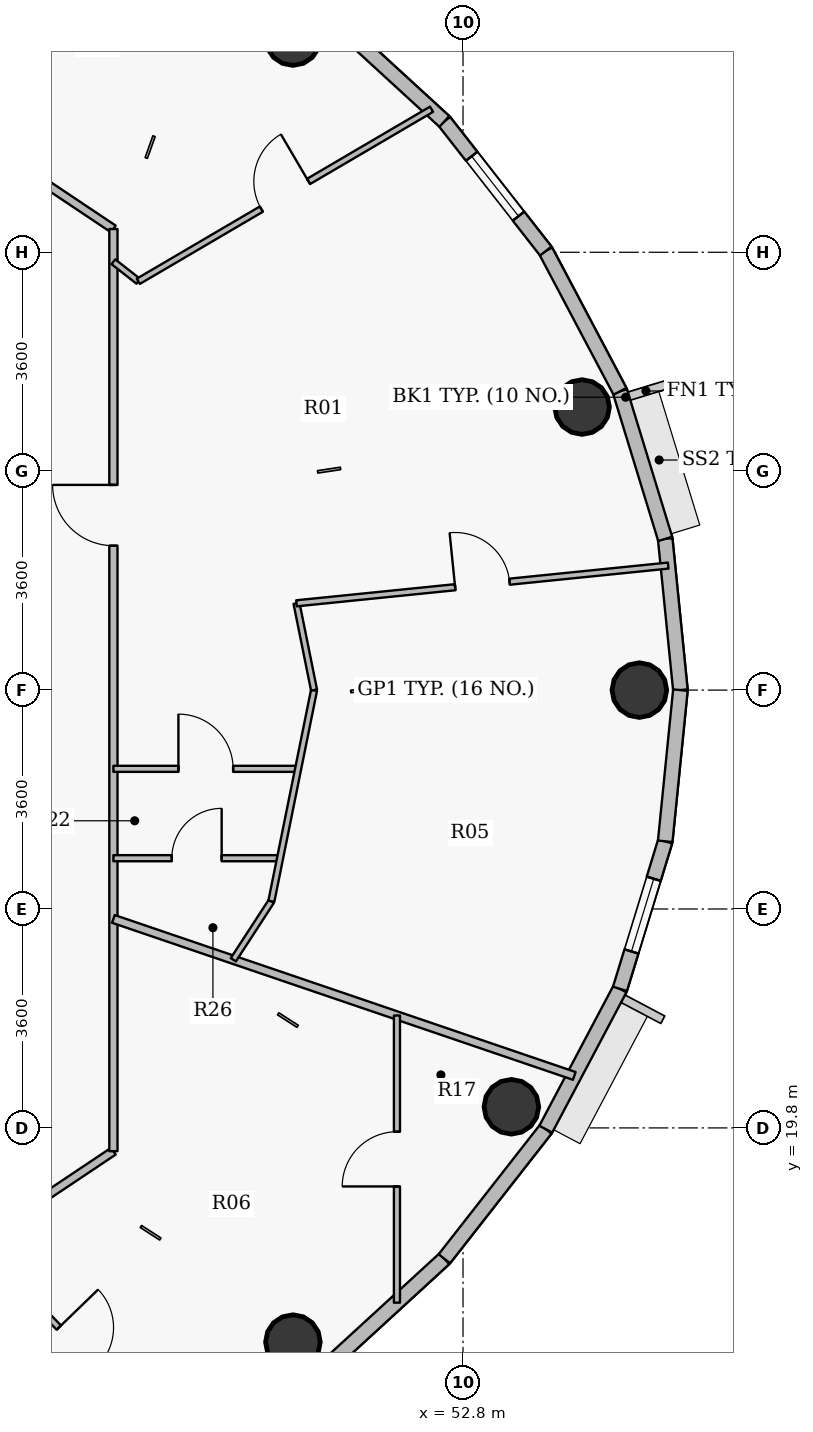
"""IFC4 building model, lengths in metres.
Left out: names, types, materials, properties, quantities, classifications, styles, units other than length and angle.
Written with IfcOpenShell. Run it as: python <this file> out.ifc"""

import sys

from ifc_helpers import new_model, si_unit, direction, frame, frame_2d, origin, origin_2d, place, context, subcontext, project, spatial, rectangle, hollow_circle, extrude, source, transform, mapped, element, fill, save


model = new_model("IFC4")
c1 = context("Model", 3, precision=1e-05, world=origin(), true_north=direction((0.0, 1.0)))
c2 = subcontext(c1, "Body", "Model", "MODEL_VIEW")
j1 = project(units=[si_unit("LENGTHUNIT", "METRE"), si_unit("PLANEANGLEUNIT", "RADIAN")], contexts=[c1])
p1 = place(None, origin())
s1 = spatial("IfcSite", under=j1, at=p1, CompositionType="ELEMENT")
p2 = place(p1, origin())
s2 = spatial("IfcBuilding", under=s1, at=p2, CompositionType="ELEMENT")
p3 = place(p2, frame((0.0, 0.0, 331.6)))
s3 = spatial("IfcBuildingStorey", under=s2, at=p3, CompositionType="ELEMENT", Elevation=331.6)
for number, where, z_axis, x_axis in (
    (1, (55.7, 27.0, 0.0), (0.0, 0.0, 1.0), (1.0, 0.0, 0.0)),
    (2, (54.758, 31.655, 0.0), (0.0, 0.0, 1.0), (1.0, 0.0, 0.0)),
    (3, (50.002, 37.723, 0.0), (0.0, 0.0, 1.0), (1.0, 0.0, 0.0)),
    (4, (50.002, 16.277, 0.0), (0.0, 0.0, 1.0), (1.0, 0.0, 0.0)),
    (5, (53.595, 20.147, 0.0), (0.0, 0.0, 1.0), (1.0, 0.0, 0.0)),
):
    element("IfcColumn", number, at=place(p3, frame(where, z_axis=z_axis, x_axis=x_axis)), inside=s3, PredefinedType="COLUMN", context=c2, shape_type="SweptSolid", body=[
        extrude(hollow_circle(Radius=0.45, WallThickness=0.028, at=origin_2d()), origin(), (0.0, 0.0, 1.0), 3.8),
    ])
p4 = place(p3, frame((56.125, 29.487, 0.0), z_axis=(0.0, 0.0, 1.0), x_axis=(0.100025963401, -0.994984827344, 0.0)))
e6 = element("IfcWall", 6, at=p4, inside=s3, PredefinedType="SOLIDWALL", context=c2, shape_type="SweptSolid", body=[
    extrude(rectangle(XDim=2.499, YDim=0.24, at=frame_2d((1.25, 0.0))), origin(), (0.0, 0.0, 1.0), 3.55),
])
p5 = place(p3, frame((55.381, 31.913, 0.0), z_axis=(0.0, 0.0, 1.0), x_axis=(0.293105547213, -0.956080089842, 0.0)))
e7 = element("IfcWall", 7, at=p5, inside=s3, PredefinedType="SOLIDWALL", context=c2, shape_type="SweptSolid", body=[
    extrude(rectangle(XDim=2.538, YDim=0.24, at=frame_2d((1.269, 0.0))), origin(), (0.0, 0.0, 1.0), 3.55),
])
p6 = place(p3, frame((54.161, 34.221, 0.0), z_axis=(0.0, 0.0, 1.0), x_axis=(0.467487999989, -0.883999417345, 0.0)))
e8 = element("IfcWall", 8, at=p6, inside=s3, PredefinedType="SOLIDWALL", context=c2, shape_type="SweptSolid", body=[
    extrude(rectangle(XDim=2.61, YDim=0.24, at=frame_2d((1.305, 0.0))), origin(), (0.0, 0.0, 1.0), 3.55),
])
p7 = place(p3, frame((52.493, 36.352, 0.0), z_axis=(0.0, 0.0, 1.0), x_axis=(0.616286367698, -0.78752213492, 0.0)))
e9 = element("IfcWall", 9, at=p7, inside=s3, PredefinedType="SOLIDWALL", context=c2, shape_type="SweptSolid", body=[
    extrude(rectangle(XDim=2.706, YDim=0.24, at=frame_2d((1.353, 0.0))), origin(), (0.0, 0.0, 1.0), 3.55),
])
p8 = place(p7, frame((0.728, 0.0, 0.9)))
e10 = element("IfcOpeningElement", 10, at=p8, cuts=e9, PredefinedType="OPENING", context=c2, shape_type="SweptSolid", body=[
    extrude(rectangle(XDim=1.25, YDim=1.65, at=origin_2d()), frame((0.625, 0.13, 0.825), z_axis=(0.0, -1.0, 0.0), x_axis=(1.0, 0.0, 0.0)), (0.0, 0.0, 1.0), 0.26),
])
for number, where, z_axis, x_axis in (
    (11, (50.419, 38.254, 0.0), (0.0, 0.0, 1.0), (0.737, -0.676, 0.0)),
    (12, (52.493, 17.648, 0.0), (0.0, 0.0, 1.0), (-0.737, -0.676, 0.0)),
):
    element("IfcWall", number, at=place(p3, frame(where, z_axis=z_axis, x_axis=x_axis)), inside=s3, PredefinedType="SOLIDWALL", context=c2, shape_type="SweptSolid", body=[
        extrude(rectangle(XDim=2.815, YDim=0.24, at=frame_2d((1.407, 0.0))), origin(), (0.0, 0.0, 1.0), 3.55),
    ])
p9 = place(p3, frame((54.161, 19.779, 0.0), z_axis=(0.0, 0.0, 1.0), x_axis=(-0.616286367698, -0.78752213492, 0.0)))
e13 = element("IfcWall", 13, at=p9, inside=s3, PredefinedType="SOLIDWALL", context=c2, shape_type="SweptSolid", body=[
    extrude(rectangle(XDim=2.706, YDim=0.24, at=frame_2d((1.353, 0.0))), origin(), (0.0, 0.0, 1.0), 3.55),
])
p10 = place(p3, frame((55.381, 22.087, 0.0), z_axis=(0.0, 0.0, 1.0), x_axis=(-0.467487999989, -0.883999417345, 0.0)))
e14 = element("IfcWall", 14, at=p10, inside=s3, PredefinedType="SOLIDWALL", context=c2, shape_type="SweptSolid", body=[
    extrude(rectangle(XDim=2.61, YDim=0.24, at=frame_2d((1.305, 0.0))), origin(), (0.0, 0.0, 1.0), 3.55),
])
p11 = place(p3, frame((56.125, 24.513, 0.0), z_axis=(0.0, 0.0, 1.0), x_axis=(-0.293105547213, -0.956080089842, 0.0)))
e15 = element("IfcWall", 15, at=p11, inside=s3, PredefinedType="SOLIDWALL", context=c2, shape_type="SweptSolid", body=[
    extrude(rectangle(XDim=2.538, YDim=0.24, at=frame_2d((1.269, 0.0))), origin(), (0.0, 0.0, 1.0), 3.55),
])
p12 = place(p11, frame((0.644, 0.0, 0.9)))
e16 = element("IfcOpeningElement", 16, at=p12, cuts=e15, PredefinedType="OPENING", context=c2, shape_type="SweptSolid", body=[
    extrude(rectangle(XDim=1.25, YDim=1.65, at=origin_2d()), frame((0.625, 0.13, 0.825), z_axis=(0.0, -1.0, 0.0), x_axis=(1.0, 0.0, 0.0)), (0.0, 0.0, 1.0), 0.26),
])
p13 = place(p3, frame((56.375, 27.0, 0.0), z_axis=(0.0, 0.0, 1.0), x_axis=(-0.100025963401, -0.994984827344, 0.0)))
e17 = element("IfcWall", 17, at=p13, inside=s3, PredefinedType="SOLIDWALL", context=c2, shape_type="SweptSolid", body=[
    extrude(rectangle(XDim=2.499, YDim=0.24, at=frame_2d((1.25, 0.0))), origin(), (0.0, 0.0, 1.0), 3.55),
])
p14 = place(p3, frame((44.645, 18.073, 0.0), z_axis=(0.0, 0.0, 1.0), x_axis=(0.695656073062, -0.718374991221, 0.0)))
e18 = element("IfcWall", 18, at=p14, inside=s3, PredefinedType="PARTITIONING", context=c2, shape_type="SweptSolid", body=[
    extrude(rectangle(XDim=5.233, YDim=0.1, at=frame_2d((2.617, 0.0))), origin(), (0.0, 0.0, 1.0), 3.035),
])
p15 = place(p14, frame((2.167, 0.0, 0.0)))
e19 = element("IfcOpeningElement", 19, at=p15, cuts=e18, PredefinedType="OPENING", context=c2, shape_type="SweptSolid", body=[
    extrude(rectangle(XDim=0.9, YDim=2.1, at=origin_2d()), frame((0.45, 0.06, 1.05), z_axis=(0.0, -1.0, 0.0), x_axis=(1.0, 0.0, 0.0)), (0.0, 0.0, 1.0), 0.12),
])
for number, where, z_axis, x_axis in (
    (20, (45.541, 18.408, 0.0), (0.0, 0.0, 1.0), (0.831, 0.556, 0.0)),
    (21, (45.541, 35.592, 0.0), (0.0, 0.0, 1.0), (0.831, -0.556, 0.0)),
):
    element("IfcWall", number, at=place(p3, frame(where, z_axis=z_axis, x_axis=x_axis)), inside=s3, PredefinedType="PARTITIONING", context=c2, shape_type="SweptSolid", body=[
        extrude(rectangle(XDim=1.815, YDim=0.135, at=frame_2d((0.908, 0.0))), origin(), (0.0, 0.0, 1.0), 3.085),
    ])
p16 = place(p3, frame((47.05, 19.417, 0.0), z_axis=(0.0, 0.0, 1.0), x_axis=(0.0, 1.0, 0.0)))
e22 = element("IfcWall", 22, at=p16, inside=s3, PredefinedType="PARTITIONING", context=c2, shape_type="SweptSolid", body=[
    extrude(rectangle(XDim=15.165, YDim=0.135, at=frame_2d((7.583, 0.0))), origin(), (0.0, 0.0, 1.0), 3.085),
])
p17 = place(p16, frame((9.957, 0.0, 0.0)))
e23 = element("IfcOpeningElement", 23, at=p17, cuts=e22, PredefinedType="OPENING", context=c2, shape_type="SweptSolid", body=[
    extrude(rectangle(XDim=1.0, YDim=2.15, at=origin_2d()), frame((0.5, 0.078, 1.075), z_axis=(0.0, -1.0, 0.0), x_axis=(1.0, 0.0, 0.0)), (0.0, 0.0, 1.0), 0.155),
])
p18 = place(p3, frame((47.05, 23.237, 0.0), z_axis=(0.0, 0.0, 1.0), x_axis=(0.946614475353, -0.32236785673, 0.0)))
e24 = element("IfcWall", 24, at=p18, inside=s3, PredefinedType="PARTITIONING", context=c2, shape_type="SweptSolid", body=[
    extrude(rectangle(XDim=8.007, YDim=0.135, at=frame_2d((4.004, 0.0))), origin(), (0.0, 0.0, 1.0), 3.035),
])
p19 = place(p3, frame((47.05, 24.235, 0.0), z_axis=(0.0, 0.0, 1.0), x_axis=(1.0, 0.0, 0.0)))
e25 = element("IfcWall", 25, at=p19, inside=s3, PredefinedType="PARTITIONING", context=c2, shape_type="SweptSolid", body=[
    extrude(rectangle(XDim=2.741, YDim=0.1, at=frame_2d((1.37, 0.0))), origin(), (0.0, 0.0, 1.0), 3.55),
])
p20 = place(p19, frame((0.96, 0.0, 0.0)))
e26 = element("IfcOpeningElement", 26, at=p20, cuts=e25, PredefinedType="OPENING", context=c2, shape_type="SweptSolid", body=[
    extrude(rectangle(XDim=0.82, YDim=2.1, at=origin_2d()), frame((0.41, 0.06, 1.05), z_axis=(0.0, -1.0, 0.0), x_axis=(1.0, 0.0, 0.0)), (0.0, 0.0, 1.0), 0.12),
])
p21 = place(p3, frame((47.05, 25.705, 0.0), z_axis=(0.0, 0.0, 1.0), x_axis=(1.0, 0.0, 0.0)))
e27 = element("IfcWall", 27, at=p21, inside=s3, PredefinedType="PARTITIONING", context=c2, shape_type="SweptSolid", body=[
    extrude(rectangle(XDim=3.038, YDim=0.1, at=frame_2d((1.519, 0.0))), origin(), (0.0, 0.0, 1.0), 3.55),
])
p22 = place(p21, frame((1.069, 0.0, 0.0)))
e28 = element("IfcOpeningElement", 28, at=p22, cuts=e27, PredefinedType="OPENING", context=c2, shape_type="SweptSolid", body=[
    extrude(rectangle(XDim=0.9, YDim=2.1, at=origin_2d()), frame((0.45, 0.06, 1.05), z_axis=(0.0, -1.0, 0.0), x_axis=(1.0, 0.0, 0.0)), (0.0, 0.0, 1.0), 0.12),
])
p23 = place(p3, frame((47.05, 34.044, 0.0), z_axis=(0.0, 0.0, 1.0), x_axis=(0.787277370311, -0.616599012483, 0.0)))
e29 = element("IfcWall", 29, at=p23, inside=s3, PredefinedType="PARTITIONING", context=c2, shape_type="SweptSolid", body=[
    extrude(rectangle(XDim=0.521, YDim=0.1, at=frame_2d((0.26, 0.0))), origin(), (0.0, 0.0, 1.0), 3.55),
])
p24 = place(p3, frame((47.46, 33.723, 0.0), z_axis=(0.0, 0.0, 1.0), x_axis=(0.862533037069, 0.506000750952, 0.0)))
e30 = element("IfcWall", 30, at=p24, inside=s3, PredefinedType="PARTITIONING", context=c2, shape_type="SweptSolid", body=[
    extrude(rectangle(XDim=5.591, YDim=0.1, at=frame_2d((2.795, 0.0))), origin(), (0.0, 0.0, 1.0), 3.035),
])
p25 = place(p24, frame((2.345, 0.0, 0.0)))
e31 = element("IfcOpeningElement", 31, at=p25, cuts=e30, PredefinedType="OPENING", context=c2, shape_type="SweptSolid", body=[
    extrude(rectangle(XDim=0.9, YDim=2.1, at=origin_2d()), frame((0.45, 0.06, 1.05), z_axis=(0.0, -1.0, 0.0), x_axis=(1.0, 0.0, 0.0)), (0.0, 0.0, 1.0), 0.12),
])
p26 = place(p3, frame((49.022, 22.565, 0.0), z_axis=(0.0, 0.0, 1.0), x_axis=(0.545436909984, 0.838151881957, 0.0)))
e32 = element("IfcWall", 32, at=p26, inside=s3, PredefinedType="PARTITIONING", context=c2, shape_type="SweptSolid", body=[
    extrude(rectangle(XDim=1.148, YDim=0.1, at=frame_2d((0.574, 0.0))), origin(), (0.0, 0.0, 1.0), 3.55),
])
p27 = place(p3, frame((49.648, 23.527, 0.0), z_axis=(0.0, 0.0, 1.0), x_axis=(0.198249177906, 0.980151653296, 0.0)))
e33 = element("IfcWall", 33, at=p27, inside=s3, PredefinedType="PARTITIONING", context=c2, shape_type="SweptSolid", body=[
    extrude(rectangle(XDim=3.543, YDim=0.1, at=frame_2d((1.771, 0.0))), origin(), (0.0, 0.0, 1.0), 3.085),
])
p28 = place(p3, frame((50.061, 28.427, 0.0), z_axis=(0.0, 0.0, 1.0), x_axis=(0.198372931515, -0.980126614291, 0.0)))
e34 = element("IfcWall", 34, at=p28, inside=s3, PredefinedType="PARTITIONING", context=c2, shape_type="SweptSolid", body=[
    extrude(rectangle(XDim=1.456, YDim=0.1, at=frame_2d((0.728, 0.0))), origin(), (0.0, 0.0, 1.0), 3.085),
])
p29 = place(p3, frame((50.061, 28.427, 0.0), z_axis=(0.0, 0.0, 1.0), x_axis=(0.994890167578, 0.100963134143, 0.0)))
e35 = element("IfcWall", 35, at=p29, inside=s3, PredefinedType="PARTITIONING", context=c2, shape_type="SweptSolid", body=[
    extrude(rectangle(XDim=6.145, YDim=0.1, at=frame_2d((3.072, 0.0))), origin(), (0.0, 0.0, 1.0), 3.035),
])
p30 = place(p29, frame((2.622, 0.0, 0.0)))
e36 = element("IfcOpeningElement", 36, at=p30, cuts=e35, PredefinedType="OPENING", context=c2, shape_type="SweptSolid", body=[
    extrude(rectangle(XDim=0.9, YDim=2.1, at=origin_2d()), frame((0.45, 0.06, 1.05), z_axis=(0.0, -1.0, 0.0), x_axis=(1.0, 0.0, 0.0)), (0.0, 0.0, 1.0), 0.12),
])
p31 = place(p3, frame((51.713, 16.926, 0.0), z_axis=(0.0, 0.0, 1.0), x_axis=(0.0, 1.0, 0.0)))
e37 = element("IfcWall", 37, at=p31, inside=s3, PredefinedType="PARTITIONING", context=c2, shape_type="SweptSolid", body=[
    extrude(rectangle(XDim=4.722, YDim=0.1, at=frame_2d((2.361, 0.0))), origin(), (0.0, 0.0, 1.0), 3.035),
])
p32 = place(p31, frame((1.911, 0.0, 0.0)))
e38 = element("IfcOpeningElement", 38, at=p32, cuts=e37, PredefinedType="OPENING", context=c2, shape_type="SweptSolid", body=[
    extrude(rectangle(XDim=0.9, YDim=2.1, at=origin_2d()), frame((0.45, 0.06, 1.05), z_axis=(0.0, -1.0, 0.0), x_axis=(1.0, 0.0, 0.0)), (0.0, 0.0, 1.0), 0.12),
])
m1 = source(origin(), c2, "Body", "SweptSolid", [
    extrude(rectangle(XDim=1.25, YDim=1.65, at=origin_2d()), frame((0.625, 0.03, 0.825), z_axis=(0.0, -1.0, 0.0), x_axis=(1.0, 0.0, 0.0)), (0.0, 0.0, 1.0), 0.06),
])
p33 = place(p8, origin())
e39 = element("IfcWindow", 39, at=p33, inside=s3, PartitioningType="SINGLE_PANEL", PredefinedType="WINDOW", context=c2, shape_type="MappedRepresentation", body=[
    mapped(m1, transform((0.0, 0.0, 0.0), x_axis=(1.0, 0.0, 0.0), y_axis=(0.0, 1.0, 0.0), z_axis=(0.0, 0.0, 1.0), scale=1.0)),
])
fill(e10, e39)
p34 = place(p12, origin())
e40 = element("IfcWindow", 40, at=p34, inside=s3, PartitioningType="SINGLE_PANEL", PredefinedType="WINDOW", context=c2, shape_type="MappedRepresentation", body=[
    mapped(m1, transform((0.0, 0.0, 0.0), x_axis=(1.0, 0.0, 0.0), y_axis=(0.0, 1.0, 0.0), z_axis=(0.0, 0.0, 1.0), scale=1.0)),
])
fill(e16, e40)
m2 = source(origin(), c2, "Body", "SweptSolid", [
    extrude(rectangle(XDim=0.9, YDim=2.1, at=origin_2d()), frame((0.45, 0.025, 1.05), z_axis=(0.0, -1.0, 0.0), x_axis=(1.0, 0.0, 0.0)), (0.0, 0.0, 1.0), 0.05),
])
p35 = place(p15, origin())
e41 = element("IfcDoor", 41, at=p35, inside=s3, OperationType="SINGLE_SWING_LEFT", PredefinedType="DOOR", context=c2, shape_type="MappedRepresentation", body=[
    mapped(m2, transform((0.0, 0.0, 0.0), x_axis=(1.0, 0.0, 0.0), y_axis=(0.0, 1.0, 0.0), z_axis=(0.0, 0.0, 1.0), scale=1.0)),
])
fill(e19, e41)
p36 = place(p32, origin())
e42 = element("IfcDoor", 42, at=p36, inside=s3, OperationType="SINGLE_SWING_LEFT", PredefinedType="DOOR", context=c2, shape_type="MappedRepresentation", body=[
    mapped(m2, transform((0.0, 0.0, 0.0), x_axis=(1.0, 0.0, 0.0), y_axis=(0.0, 1.0, 0.0), z_axis=(0.0, 0.0, 1.0), scale=1.0)),
])
fill(e38, e42)
m3 = source(origin(), c2, "Body", "SweptSolid", [
    extrude(rectangle(XDim=1.0, YDim=2.15, at=origin_2d()), frame((0.5, 0.025, 1.075), z_axis=(0.0, -1.0, 0.0), x_axis=(1.0, 0.0, 0.0)), (0.0, 0.0, 1.0), 0.05),
])
p37 = place(p17, origin())
e43 = element("IfcDoor", 43, at=p37, inside=s3, OperationType="SINGLE_SWING_RIGHT", PredefinedType="DOOR", context=c2, shape_type="MappedRepresentation", body=[
    mapped(m3, transform((0.0, 0.0, 0.0), x_axis=(1.0, 0.0, 0.0), y_axis=(0.0, 1.0, 0.0), z_axis=(0.0, 0.0, 1.0), scale=1.0)),
])
fill(e23, e43)
p38 = place(p30, origin())
e44 = element("IfcDoor", 44, at=p38, inside=s3, OperationType="SINGLE_SWING_LEFT", PredefinedType="DOOR", context=c2, shape_type="MappedRepresentation", body=[
    mapped(m2, transform((0.0, 0.0, 0.0), x_axis=(1.0, 0.0, 0.0), y_axis=(0.0, 1.0, 0.0), z_axis=(0.0, 0.0, 1.0), scale=1.0)),
])
fill(e36, e44)
p39 = place(p25, origin())
e45 = element("IfcDoor", 45, at=p39, inside=s3, OperationType="SINGLE_SWING_RIGHT", PredefinedType="DOOR", context=c2, shape_type="MappedRepresentation", body=[
    mapped(m2, transform((0.0, 0.0, 0.0), x_axis=(1.0, 0.0, 0.0), y_axis=(0.0, 1.0, 0.0), z_axis=(0.0, 0.0, 1.0), scale=1.0)),
])
fill(e31, e45)
p40 = place(p22, origin())
e46 = element("IfcDoor", 46, at=p40, inside=s3, OperationType="SINGLE_SWING_LEFT", PredefinedType="DOOR", context=c2, shape_type="MappedRepresentation", body=[
    mapped(m2, transform((0.0, 0.0, 0.0), x_axis=(1.0, 0.0, 0.0), y_axis=(0.0, 1.0, 0.0), z_axis=(0.0, 0.0, 1.0), scale=1.0)),
])
fill(e28, e46)
m4 = source(origin(), c2, "Body", "SweptSolid", [
    extrude(rectangle(XDim=0.82, YDim=2.1, at=origin_2d()), frame((0.41, 0.025, 1.05), z_axis=(0.0, -1.0, 0.0), x_axis=(1.0, 0.0, 0.0)), (0.0, 0.0, 1.0), 0.05),
])
p41 = place(p20, origin())
e47 = element("IfcDoor", 47, at=p41, inside=s3, OperationType="SINGLE_SWING_RIGHT", PredefinedType="DOOR", context=c2, shape_type="MappedRepresentation", body=[
    mapped(m4, transform((0.0, 0.0, 0.0), x_axis=(1.0, 0.0, 0.0), y_axis=(0.0, 1.0, 0.0), z_axis=(0.0, 0.0, 1.0), scale=1.0)),
])
fill(e26, e47)
save(model, sys.argv[1])
